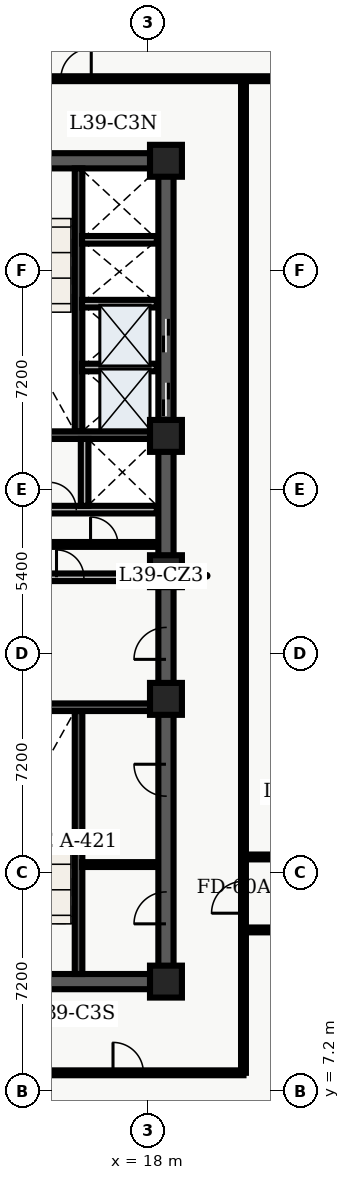
"""IFC4 building model, lengths in metres.
Left out: names, types, materials, properties, quantities, classifications, styles, units other than length and angle.
Written with IfcOpenShell. Run it as: python <this file> out.ifc"""

import sys

from ifc_helpers import new_model, entity, si_unit, converted_unit, direction, frame, origin_with_axes, origin_2d_with_axis, place, context, subcontext, project, spatial, polyline, rectangle, outline, extrude, element, fill, save


model = new_model("IFC4")
c1 = context("Model", 3, precision=1e-05, world=origin_with_axes(), true_north=direction((0.0, 1.0)))
c2 = subcontext(c1, "Body", "Model", "MODEL_VIEW")
j1 = project(units=[si_unit("LENGTHUNIT", "METRE"), converted_unit("PLANEANGLEUNIT", "DEGREE", entity("IfcPlaneAngleMeasure", 0.017), si_unit("PLANEANGLEUNIT", "RADIAN"), dimensions=[0, 0, 0, 0, 0, 0, 0])], contexts=[c1])
p1 = place(None, origin_with_axes())
s1 = spatial("IfcSite", under=j1, at=p1, CompositionType="ELEMENT")
p2 = place(p1, origin_with_axes())
s2 = spatial("IfcBuilding", under=s1, at=p2, CompositionType="ELEMENT")
p3 = place(p2, frame((0.0, 0.0, 160.2), z_axis=(0.0, 0.0, 1.0), x_axis=(1.0, 0.0, 0.0)))
s3 = spatial("IfcBuildingStorey", under=s2, at=p3, CompositionType="ELEMENT", Elevation=160.2)
p4 = place(p3, frame((11.4, 10.8, 0.0), z_axis=(0.0, 0.0, 1.0), x_axis=(1.0, 0.0, 0.0)))
e1 = element("IfcWall", 1, at=p4, inside=s3, PredefinedType="SHEAR", context=c2, shape_type="SweptSolid", body=[
    extrude(outline(polyline([(0.0, -0.25), (7.2, -0.25), (7.2, 0.25), (0.0, 0.25), (0.0, -0.25)])), origin_with_axes(), (0.0, 0.0, 1.0), 3.66),
])
p5 = place(p4, frame((2.625, 0.0, 0.0), z_axis=(0.0, 0.0, 1.0), x_axis=(1.0, 0.0, 0.0)))
e2 = element("IfcOpeningElement", 2, at=p5, cuts=e1, PredefinedType="OPENING", context=c2, shape_type="SweptSolid", body=[
    extrude(rectangle(XDim=1.05, YDim=0.52, at=origin_2d_with_axis()), origin_with_axes(), (0.0, 0.0, 1.0), 2.15),
])
p6 = place(p3, frame((11.4, 37.8, 0.0), z_axis=(0.0, 0.0, 1.0), x_axis=(1.0, 0.0, 0.0)))
e3 = element("IfcWall", 3, at=p6, inside=s3, PredefinedType="SHEAR", context=c2, shape_type="SweptSolid", body=[
    extrude(outline(polyline([(0.0, -0.25), (7.2, -0.25), (7.2, 0.25), (0.0, 0.25), (0.0, -0.25)])), origin_with_axes(), (0.0, 0.0, 1.0), 3.66),
])
p7 = place(p6, frame((2.625, 0.0, 0.0), z_axis=(0.0, 0.0, 1.0), x_axis=(1.0, 0.0, 0.0)))
e4 = element("IfcOpeningElement", 4, at=p7, cuts=e3, PredefinedType="OPENING", context=c2, shape_type="SweptSolid", body=[
    extrude(rectangle(XDim=1.05, YDim=0.52, at=origin_2d_with_axis()), origin_with_axes(), (0.0, 0.0, 1.0), 2.15),
])
p8 = place(p3, frame((18.6, 10.8, 0.0), z_axis=(0.0, 0.0, 1.0), x_axis=(0.0, 1.0, 0.0)))
e5 = element("IfcWall", 5, at=p8, inside=s3, PredefinedType="SHEAR", context=c2, shape_type="SweptSolid", body=[
    extrude(outline(polyline([(0.0, -0.25), (13.5, -0.25), (13.5, 0.25), (0.0, 0.25), (0.0, -0.25)])), origin_with_axes(), (0.0, 0.0, 1.0), 3.66),
])
p9 = place(p8, frame((11.125, 0.0, 0.0), z_axis=(0.0, 0.0, 1.0), x_axis=(1.0, 0.0, 0.0)))
e6 = element("IfcOpeningElement", 6, at=p9, cuts=e5, PredefinedType="OPENING", context=c2, shape_type="SweptSolid", body=[
    extrude(rectangle(XDim=1.05, YDim=0.52, at=origin_2d_with_axis()), origin_with_axes(), (0.0, 0.0, 1.0), 2.15),
])
p10 = place(p8, frame((2.425, 0.0, 0.0), z_axis=(0.0, 0.0, 1.0), x_axis=(1.0, 0.0, 0.0)))
e7 = element("IfcOpeningElement", 7, at=p10, cuts=e5, PredefinedType="OPENING", context=c2, shape_type="SweptSolid", body=[
    extrude(rectangle(XDim=1.05, YDim=0.52, at=origin_2d_with_axis()), origin_with_axes(), (0.0, 0.0, 1.0), 2.15),
])
p11 = place(p8, frame((6.625, 0.0, 0.0), z_axis=(0.0, 0.0, 1.0), x_axis=(1.0, 0.0, 0.0)))
e8 = element("IfcOpeningElement", 8, at=p11, cuts=e5, PredefinedType="OPENING", context=c2, shape_type="SweptSolid", body=[
    extrude(rectangle(XDim=1.05, YDim=0.52, at=origin_2d_with_axis()), origin_with_axes(), (0.0, 0.0, 1.0), 2.15),
])
p12 = place(p3, frame((18.6, 24.3, 0.0), z_axis=(0.0, 0.0, 1.0), x_axis=(0.0, 1.0, 0.0)))
e9 = element("IfcWall", 9, at=p12, inside=s3, PredefinedType="SHEAR", context=c2, shape_type="SweptSolid", body=[
    extrude(outline(polyline([(0.0, -0.25), (13.5, -0.25), (13.5, 0.25), (0.0, 0.25), (0.0, -0.25)])), origin_with_axes(), (0.0, 0.0, 1.0), 3.66),
])
p13 = place(p12, frame((5.65, 0.0, 0.0), z_axis=(0.0, 0.0, 1.0), x_axis=(1.0, 0.0, 0.0)))
e10 = element("IfcOpeningElement", 10, at=p13, cuts=e9, PredefinedType="OPENING", context=c2, shape_type="SweptSolid", body=[
    extrude(rectangle(XDim=1.1, YDim=0.52, at=origin_2d_with_axis()), origin_with_axes(), (0.0, 0.0, 1.0), 2.15),
])
p14 = place(p12, frame((7.75, 0.0, 0.0), z_axis=(0.0, 0.0, 1.0), x_axis=(1.0, 0.0, 0.0)))
e11 = element("IfcOpeningElement", 11, at=p14, cuts=e9, PredefinedType="OPENING", context=c2, shape_type="SweptSolid", body=[
    extrude(rectangle(XDim=1.1, YDim=0.52, at=origin_2d_with_axis()), origin_with_axes(), (0.0, 0.0, 1.0), 2.15),
])
p15 = place(p3, frame((15.725, 11.05, 0.0), z_axis=(0.0, 0.0, 1.0), x_axis=(0.0, 1.0, 0.0)))
e12 = element("IfcWall", 12, at=p15, inside=s3, PredefinedType="SHEAR", context=c2, shape_type="SweptSolid", body=[
    extrude(outline(polyline([(0.0, -0.125), (8.65, -0.125), (8.65, 0.125), (0.0, 0.125), (0.0, -0.125)])), origin_with_axes(), (0.0, 0.0, 1.0), 3.66),
])
p16 = place(p3, frame((11.65, 19.825, 0.0), z_axis=(0.0, 0.0, 1.0), x_axis=(1.0, 0.0, 0.0)))
e13 = element("IfcWall", 13, at=p16, inside=s3, PredefinedType="SHEAR", context=c2, shape_type="SweptSolid", body=[
    extrude(outline(polyline([(0.0, -0.125), (6.7, -0.125), (6.7, 0.125), (0.0, 0.125), (0.0, -0.125)])), origin_with_axes(), (0.0, 0.0, 1.0), 3.66),
])
p17 = place(p3, frame((15.725, 28.9, 0.0), z_axis=(0.0, 0.0, 1.0), x_axis=(0.0, 1.0, 0.0)))
e14 = element("IfcWall", 14, at=p17, inside=s3, PredefinedType="SHEAR", context=c2, shape_type="SweptSolid", body=[
    extrude(outline(polyline([(0.0, -0.125), (8.65, -0.125), (8.65, 0.125), (0.0, 0.125), (0.0, -0.125)])), origin_with_axes(), (0.0, 0.0, 1.0), 3.66),
])
p18 = place(p3, frame((11.65, 28.775, 0.0), z_axis=(0.0, 0.0, 1.0), x_axis=(1.0, 0.0, 0.0)))
e15 = element("IfcWall", 15, at=p18, inside=s3, PredefinedType="SHEAR", context=c2, shape_type="SweptSolid", body=[
    extrude(outline(polyline([(0.0, -0.125), (6.7, -0.125), (6.7, 0.125), (0.0, 0.125), (0.0, -0.125)])), origin_with_axes(), (0.0, 0.0, 1.0), 3.66),
])
p19 = place(p3, frame((11.7, 24.1, 0.0), z_axis=(0.0, 0.0, 1.0), x_axis=(1.0, 0.0, 0.0)))
e16 = element("IfcWall", 16, at=p19, inside=s3, PredefinedType="SOLIDWALL", context=c2, shape_type="SweptSolid", body=[
    extrude(outline(polyline([(0.0, -0.125), (6.6, -0.125), (6.6, 0.125), (0.0, 0.125), (0.0, -0.125)])), origin_with_axes(), (0.0, 0.0, 1.0), 2.7),
])
p20 = place(p19, frame((3.75, 0.0, 0.0), z_axis=(0.0, 0.0, 1.0), x_axis=(1.0, 0.0, 0.0)))
e17 = element("IfcOpeningElement", 17, at=p20, cuts=e16, PredefinedType="OPENING", context=c2, shape_type="SweptSolid", body=[
    extrude(rectangle(XDim=0.9, YDim=0.27, at=origin_2d_with_axis()), origin_with_axes(), (0.0, 0.0, 1.0), 2.15),
])
p21 = place(p3, frame((11.7, 26.325, 0.0), z_axis=(0.0, 0.0, 1.0), x_axis=(1.0, 0.0, 0.0)))
e18 = element("IfcWall", 18, at=p21, inside=s3, PredefinedType="SOLIDWALL", context=c2, shape_type="SweptSolid", body=[
    extrude(outline(polyline([(0.0, -0.125), (6.6, -0.125), (6.6, 0.125), (0.0, 0.125), (0.0, -0.125)])), origin_with_axes(), (0.0, 0.0, 1.0), 2.7),
])
p22 = place(p21, frame((3.5, 0.0, 0.0), z_axis=(0.0, 0.0, 1.0), x_axis=(1.0, 0.0, 0.0)))
e19 = element("IfcOpeningElement", 19, at=p22, cuts=e18, PredefinedType="OPENING", context=c2, shape_type="SweptSolid", body=[
    extrude(rectangle(XDim=0.9, YDim=0.27, at=origin_2d_with_axis()), origin_with_axes(), (0.0, 0.0, 1.0), 2.15),
])
p23 = place(p3, frame((15.925, 26.45, 0.0), z_axis=(0.0, 0.0, 1.0), x_axis=(0.0, 1.0, 0.0)))
e20 = element("IfcWall", 20, at=p23, inside=s3, PredefinedType="SOLIDWALL", context=c2, shape_type="SweptSolid", body=[
    extrude(outline(polyline([(0.0, -0.125), (2.2, -0.125), (2.2, 0.125), (0.0, 0.125), (0.0, -0.125)])), origin_with_axes(), (0.0, 0.0, 1.0), 2.7),
])
for number, where, z_axis, x_axis in (
    (21, (18.6, 10.8, 0.0), (0.0, 0.0, 1.0), (1.0, 0.0, 0.0)),
    (22, (18.6, 20.1, 0.0), (0.0, 0.0, 1.0), (1.0, 0.0, 0.0)),
    (23, (18.6, 24.3, 0.0), (0.0, 0.0, 1.0), (1.0, 0.0, 0.0)),
    (24, (18.6, 28.75, 0.0), (0.0, 0.0, 1.0), (1.0, 0.0, 0.0)),
    (25, (18.6, 37.8, 0.0), (0.0, 0.0, 1.0), (1.0, 0.0, 0.0)),
):
    element("IfcColumn", number, at=place(p3, frame(where, z_axis=z_axis, x_axis=x_axis)), inside=s3, PredefinedType="COLUMN", context=c2, shape_type="SweptSolid", body=[
        extrude(rectangle(XDim=1.05, YDim=1.05, at=origin_2d_with_axis()), origin_with_axes(), (0.0, 0.0, 1.0), 3.9),
    ])
p24 = place(p3, frame((14.62, 25.18, 0.0), z_axis=(0.0, 0.0, 1.0), x_axis=(1.0, 0.0, 0.0)))
e26 = element("IfcWall", 26, at=p24, inside=s3, PredefinedType="PARTITIONING", context=c2, shape_type="SweptSolid", body=[
    extrude(outline(polyline([(0.0, -0.08), (3.68, -0.08), (3.68, 0.08), (0.0, 0.08), (0.0, -0.08)])), origin_with_axes(), (0.0, 0.0, 1.0), 2.7),
])
p25 = place(p24, frame((1.95, 0.0, 0.0), z_axis=(0.0, 0.0, 1.0), x_axis=(1.0, 0.0, 0.0)))
e27 = element("IfcOpeningElement", 27, at=p25, cuts=e26, PredefinedType="OPENING", context=c2, shape_type="SweptSolid", body=[
    extrude(rectangle(XDim=0.9, YDim=0.18, at=origin_2d_with_axis()), origin_with_axes(), (0.0, 0.0, 1.0), 2.15),
])
p26 = place(p3, frame((15.84, 14.65, 0.0), z_axis=(0.0, 0.0, 1.0), x_axis=(1.0, 0.0, 0.0)))
e28 = element("IfcWall", 28, at=p26, inside=s3, PredefinedType="PARTITIONING", context=c2, shape_type="SweptSolid", body=[
    extrude(outline(polyline([(0.0, -0.08), (2.46, -0.08), (2.46, 0.08), (0.0, 0.08), (0.0, -0.08)])), origin_with_axes(), (0.0, 0.0, 1.0), 2.7),
])
for number, where, z_axis, x_axis in (
    (29, (15.84, 31.0, 0.0), (0.0, 0.0, 1.0), (1.0, 0.0, 0.0)),
    (30, (15.84, 33.1, 0.0), (0.0, 0.0, 1.0), (1.0, 0.0, 0.0)),
    (31, (15.84, 35.2, 0.0), (0.0, 0.0, 1.0), (1.0, 0.0, 0.0)),
):
    element("IfcWall", number, at=place(p3, frame(where, z_axis=z_axis, x_axis=x_axis)), inside=s3, PredefinedType="SOLIDWALL", context=c2, shape_type="SweptSolid", body=[
        extrude(outline(polyline([(0.0, -0.125), (2.46, -0.125), (2.46, 0.125), (0.0, 0.125), (0.0, -0.125)])), origin_with_axes(), (0.0, 0.0, 1.0), 2.7),
    ])
p27 = place(p3, frame((2.6, 7.8, 0.0), z_axis=(0.0, 0.0, 1.0), x_axis=(1.0, 0.0, 0.0)))
e32 = element("IfcWall", 32, at=p27, inside=s3, PredefinedType="PARTITIONING", context=c2, shape_type="SweptSolid", body=[
    extrude(outline(polyline([(0.0, -0.08), (18.55, -0.08), (18.55, 0.08), (0.0, 0.08), (0.0, -0.08)])), origin_with_axes(), (0.0, 0.0, 1.0), 2.7),
])
p28 = place(p27, frame((2.551, 0.0, 0.0), z_axis=(0.0, 0.0, 1.0), x_axis=(1.0, 0.0, 0.0)))
e33 = element("IfcOpeningElement", 33, at=p28, cuts=e32, PredefinedType="OPENING", context=c2, shape_type="SweptSolid", body=[
    extrude(rectangle(XDim=1.0, YDim=0.18, at=origin_2d_with_axis()), origin_with_axes(), (0.0, 0.0, 1.0), 2.15),
])
p29 = place(p27, frame((8.065, 0.0, 0.0), z_axis=(0.0, 0.0, 1.0), x_axis=(1.0, 0.0, 0.0)))
e34 = element("IfcOpeningElement", 34, at=p29, cuts=e32, PredefinedType="OPENING", context=c2, shape_type="SweptSolid", body=[
    extrude(rectangle(XDim=1.0, YDim=0.18, at=origin_2d_with_axis()), origin_with_axes(), (0.0, 0.0, 1.0), 2.15),
])
p30 = place(p27, frame((14.758, 0.0, 0.0), z_axis=(0.0, 0.0, 1.0), x_axis=(1.0, 0.0, 0.0)))
e35 = element("IfcOpeningElement", 35, at=p30, cuts=e32, PredefinedType="OPENING", context=c2, shape_type="SweptSolid", body=[
    extrude(rectangle(XDim=1.0, YDim=0.18, at=origin_2d_with_axis()), origin_with_axes(), (0.0, 0.0, 1.0), 2.15),
])
p31 = place(p3, frame((2.6, 40.5, 0.0), z_axis=(0.0, 0.0, 1.0), x_axis=(1.0, 0.0, 0.0)))
e36 = element("IfcWall", 36, at=p31, inside=s3, PredefinedType="PARTITIONING", context=c2, shape_type="SweptSolid", body=[
    extrude(outline(polyline([(0.0, -0.08), (20.481, -0.08), (20.481, 0.08), (0.0, 0.08), (0.0, -0.08)])), origin_with_axes(), (0.0, 0.0, 1.0), 2.7),
])
p32 = place(p31, frame((4.395, 0.0, 0.0), z_axis=(0.0, 0.0, 1.0), x_axis=(1.0, 0.0, 0.0)))
e37 = element("IfcOpeningElement", 37, at=p32, cuts=e36, PredefinedType="OPENING", context=c2, shape_type="SweptSolid", body=[
    extrude(rectangle(XDim=1.2, YDim=0.18, at=origin_2d_with_axis()), origin_with_axes(), (0.0, 0.0, 1.0), 2.2),
])
p33 = place(p31, frame((13.043, 0.0, 0.0), z_axis=(0.0, 0.0, 1.0), x_axis=(1.0, 0.0, 0.0)))
e38 = element("IfcOpeningElement", 38, at=p33, cuts=e36, PredefinedType="OPENING", context=c2, shape_type="SweptSolid", body=[
    extrude(rectangle(XDim=1.0, YDim=0.18, at=origin_2d_with_axis()), origin_with_axes(), (0.0, 0.0, 1.0), 2.15),
])
p34 = place(p3, frame((21.15, 7.8, 0.0), z_axis=(0.0, 0.0, 1.0), x_axis=(0.0, 1.0, 0.0)))
e39 = element("IfcWall", 39, at=p34, inside=s3, PredefinedType="PARTITIONING", context=c2, shape_type="SweptSolid", body=[
    extrude(outline(polyline([(0.0, -0.08), (32.7, -0.08), (32.7, 0.08), (0.0, 0.08), (0.0, -0.08)])), origin_with_axes(), (0.0, 0.0, 1.0), 2.7),
])
p35 = place(p34, frame((5.775, 0.0, 0.0), z_axis=(0.0, 0.0, 1.0), x_axis=(1.0, 0.0, 0.0)))
e40 = element("IfcOpeningElement", 40, at=p35, cuts=e39, PredefinedType="OPENING", context=c2, shape_type="SweptSolid", body=[
    extrude(rectangle(XDim=1.05, YDim=0.18, at=origin_2d_with_axis()), origin_with_axes(), (0.0, 0.0, 1.0), 2.15),
])
p36 = place(p3, frame((21.15, 12.5, 0.0), z_axis=(0.0, 0.0, 1.0), x_axis=(1.0, 0.0, 0.0)))
e41 = element("IfcWall", 41, at=p36, inside=s3, PredefinedType="PARTITIONING", context=c2, shape_type="SweptSolid", body=[
    extrude(outline(polyline([(0.0, -0.08), (15.2, -0.08), (15.2, 0.08), (0.0, 0.08), (0.0, -0.08)])), origin_with_axes(), (0.0, 0.0, 1.0), 2.7),
])
p37 = place(p36, frame((3.468, 0.0, 0.0), z_axis=(0.0, 0.0, 1.0), x_axis=(1.0, 0.0, 0.0)))
e42 = element("IfcOpeningElement", 42, at=p37, cuts=e41, PredefinedType="OPENING", context=c2, shape_type="SweptSolid", body=[
    extrude(rectangle(XDim=1.0, YDim=0.18, at=origin_2d_with_axis()), origin_with_axes(), (0.0, 0.0, 1.0), 2.15),
])
p38 = place(p36, frame((10.938, 0.0, 0.0), z_axis=(0.0, 0.0, 1.0), x_axis=(1.0, 0.0, 0.0)))
e43 = element("IfcOpeningElement", 43, at=p38, cuts=e41, PredefinedType="OPENING", context=c2, shape_type="SweptSolid", body=[
    extrude(rectangle(XDim=1.2, YDim=0.18, at=origin_2d_with_axis()), origin_with_axes(), (0.0, 0.0, 1.0), 2.2),
])
p39 = place(p3, frame((21.15, 14.9, 0.0), z_axis=(0.0, 0.0, 1.0), x_axis=(1.0, 0.0, 0.0)))
e44 = element("IfcWall", 44, at=p39, inside=s3, PredefinedType="PARTITIONING", context=c2, shape_type="SweptSolid", body=[
    extrude(outline(polyline([(0.0, -0.08), (15.2, -0.08), (15.2, 0.08), (0.0, 0.08), (0.0, -0.08)])), origin_with_axes(), (0.0, 0.0, 1.0), 2.7),
])
p40 = place(p39, frame((1.942, 0.0, 0.0), z_axis=(0.0, 0.0, 1.0), x_axis=(1.0, 0.0, 0.0)))
e45 = element("IfcOpeningElement", 45, at=p40, cuts=e44, PredefinedType="OPENING", context=c2, shape_type="SweptSolid", body=[
    extrude(rectangle(XDim=1.0, YDim=0.18, at=origin_2d_with_axis()), origin_with_axes(), (0.0, 0.0, 1.0), 2.15),
])
p41 = place(p39, frame((5.077, 0.0, 0.0), z_axis=(0.0, 0.0, 1.0), x_axis=(1.0, 0.0, 0.0)))
e46 = element("IfcOpeningElement", 46, at=p41, cuts=e44, PredefinedType="OPENING", context=c2, shape_type="SweptSolid", body=[
    extrude(rectangle(XDim=1.0, YDim=0.18, at=origin_2d_with_axis()), origin_with_axes(), (0.0, 0.0, 1.0), 2.15),
])
p42 = place(p39, frame((9.281, 0.0, 0.0), z_axis=(0.0, 0.0, 1.0), x_axis=(1.0, 0.0, 0.0)))
e47 = element("IfcOpeningElement", 47, at=p42, cuts=e44, PredefinedType="OPENING", context=c2, shape_type="SweptSolid", body=[
    extrude(rectangle(XDim=1.0, YDim=0.18, at=origin_2d_with_axis()), origin_with_axes(), (0.0, 0.0, 1.0), 2.15),
])
p43 = place(p39, frame((13.617, 0.0, 0.0), z_axis=(0.0, 0.0, 1.0), x_axis=(1.0, 0.0, 0.0)))
e48 = element("IfcOpeningElement", 48, at=p43, cuts=e44, PredefinedType="OPENING", context=c2, shape_type="SweptSolid", body=[
    extrude(rectangle(XDim=1.0, YDim=0.18, at=origin_2d_with_axis()), origin_with_axes(), (0.0, 0.0, 1.0), 2.15),
])
p44 = place(p12, frame((5.65, 0.0, 0.0), z_axis=(0.0, 0.0, 1.0), x_axis=(1.0, 0.0, 0.0)))
e49 = element("IfcDoor", 49, at=p44, inside=s3, OperationType="SLIDING_TO_LEFT", PredefinedType="DOOR", context=c2, shape_type="SweptSolid", body=[
    extrude(rectangle(XDim=1.1, YDim=0.09, at=origin_2d_with_axis()), origin_with_axes(), (0.0, 0.0, 1.0), 2.15),
])
fill(e10, e49)
p45 = place(p12, frame((7.75, 0.0, 0.0), z_axis=(0.0, 0.0, 1.0), x_axis=(1.0, 0.0, 0.0)))
e50 = element("IfcDoor", 50, at=p45, inside=s3, OperationType="SLIDING_TO_RIGHT", PredefinedType="DOOR", context=c2, shape_type="SweptSolid", body=[
    extrude(rectangle(XDim=1.1, YDim=0.09, at=origin_2d_with_axis()), origin_with_axes(), (0.0, 0.0, 1.0), 2.15),
])
fill(e11, e50)
p46 = place(p8, frame((11.125, 0.0, 0.0), z_axis=(0.0, 0.0, 1.0), x_axis=(1.0, 0.0, 0.0)))
e51 = element("IfcDoor", 51, at=p46, inside=s3, OperationType="SINGLE_SWING_LEFT", PredefinedType="DOOR", context=c2, shape_type="SweptSolid", body=[
    extrude(rectangle(XDim=1.05, YDim=0.09, at=origin_2d_with_axis()), origin_with_axes(), (0.0, 0.0, 1.0), 2.15),
])
fill(e6, e51)
p47 = place(p21, frame((3.5, 0.0, 0.0), z_axis=(0.0, 0.0, 1.0), x_axis=(1.0, 0.0, 0.0)))
e52 = element("IfcDoor", 52, at=p47, inside=s3, OperationType="SINGLE_SWING_LEFT", PredefinedType="DOOR", context=c2, shape_type="SweptSolid", body=[
    extrude(rectangle(XDim=0.9, YDim=0.09, at=origin_2d_with_axis()), origin_with_axes(), (0.0, 0.0, 1.0), 2.15),
])
fill(e19, e52)
p48 = place(p19, frame((3.75, 0.0, 0.0), z_axis=(0.0, 0.0, 1.0), x_axis=(1.0, 0.0, 0.0)))
e53 = element("IfcDoor", 53, at=p48, inside=s3, OperationType="SINGLE_SWING_LEFT", PredefinedType="DOOR", context=c2, shape_type="SweptSolid", body=[
    extrude(rectangle(XDim=0.9, YDim=0.09, at=origin_2d_with_axis()), origin_with_axes(), (0.0, 0.0, 1.0), 2.15),
])
fill(e17, e53)
p49 = place(p24, frame((1.95, 0.0, 0.0), z_axis=(0.0, 0.0, 1.0), x_axis=(1.0, 0.0, 0.0)))
e54 = element("IfcDoor", 54, at=p49, inside=s3, OperationType="SINGLE_SWING_LEFT", PredefinedType="DOOR", context=c2, shape_type="SweptSolid", body=[
    extrude(rectangle(XDim=0.9, YDim=0.09, at=origin_2d_with_axis()), origin_with_axes(), (0.0, 0.0, 1.0), 2.15),
])
fill(e27, e54)
p50 = place(p8, frame((2.425, 0.0, 0.0), z_axis=(0.0, 0.0, 1.0), x_axis=(1.0, 0.0, 0.0)))
e55 = element("IfcDoor", 55, at=p50, inside=s3, OperationType="SINGLE_SWING_LEFT", PredefinedType="DOOR", context=c2, shape_type="SweptSolid", body=[
    extrude(rectangle(XDim=1.05, YDim=0.09, at=origin_2d_with_axis()), origin_with_axes(), (0.0, 0.0, 1.0), 2.15),
])
fill(e7, e55)
p51 = place(p8, frame((6.625, 0.0, 0.0), z_axis=(0.0, 0.0, 1.0), x_axis=(1.0, 0.0, 0.0)))
e56 = element("IfcDoor", 56, at=p51, inside=s3, OperationType="SINGLE_SWING_RIGHT", PredefinedType="DOOR", context=c2, shape_type="SweptSolid", body=[
    extrude(rectangle(XDim=1.05, YDim=0.09, at=origin_2d_with_axis()), origin_with_axes(), (0.0, 0.0, 1.0), 2.15),
])
fill(e8, e56)
p52 = place(p27, frame((14.758, 0.0, 0.0), z_axis=(0.0, 0.0, 1.0), x_axis=(1.0, 0.0, 0.0)))
e57 = element("IfcDoor", 57, at=p52, inside=s3, OperationType="SINGLE_SWING_LEFT", PredefinedType="DOOR", context=c2, shape_type="SweptSolid", body=[
    extrude(rectangle(XDim=1.0, YDim=0.09, at=origin_2d_with_axis()), origin_with_axes(), (0.0, 0.0, 1.0), 2.15),
])
fill(e35, e57)
p53 = place(p31, frame((13.043, 0.0, 0.0), z_axis=(0.0, 0.0, 1.0), x_axis=(1.0, 0.0, 0.0)))
e58 = element("IfcDoor", 58, at=p53, inside=s3, OperationType="SINGLE_SWING_RIGHT", PredefinedType="DOOR", context=c2, shape_type="SweptSolid", body=[
    extrude(rectangle(XDim=1.0, YDim=0.09, at=origin_2d_with_axis()), origin_with_axes(), (0.0, 0.0, 1.0), 2.15),
])
fill(e38, e58)
p54 = place(p34, frame((5.775, 0.0, 0.0), z_axis=(0.0, 0.0, 1.0), x_axis=(1.0, 0.0, 0.0)))
e59 = element("IfcDoor", 59, at=p54, inside=s3, OperationType="SINGLE_SWING_LEFT", PredefinedType="DOOR", context=c2, shape_type="SweptSolid", body=[
    extrude(rectangle(XDim=1.05, YDim=0.09, at=origin_2d_with_axis()), origin_with_axes(), (0.0, 0.0, 1.0), 2.15),
])
fill(e40, e59)
save(model, sys.argv[1])
